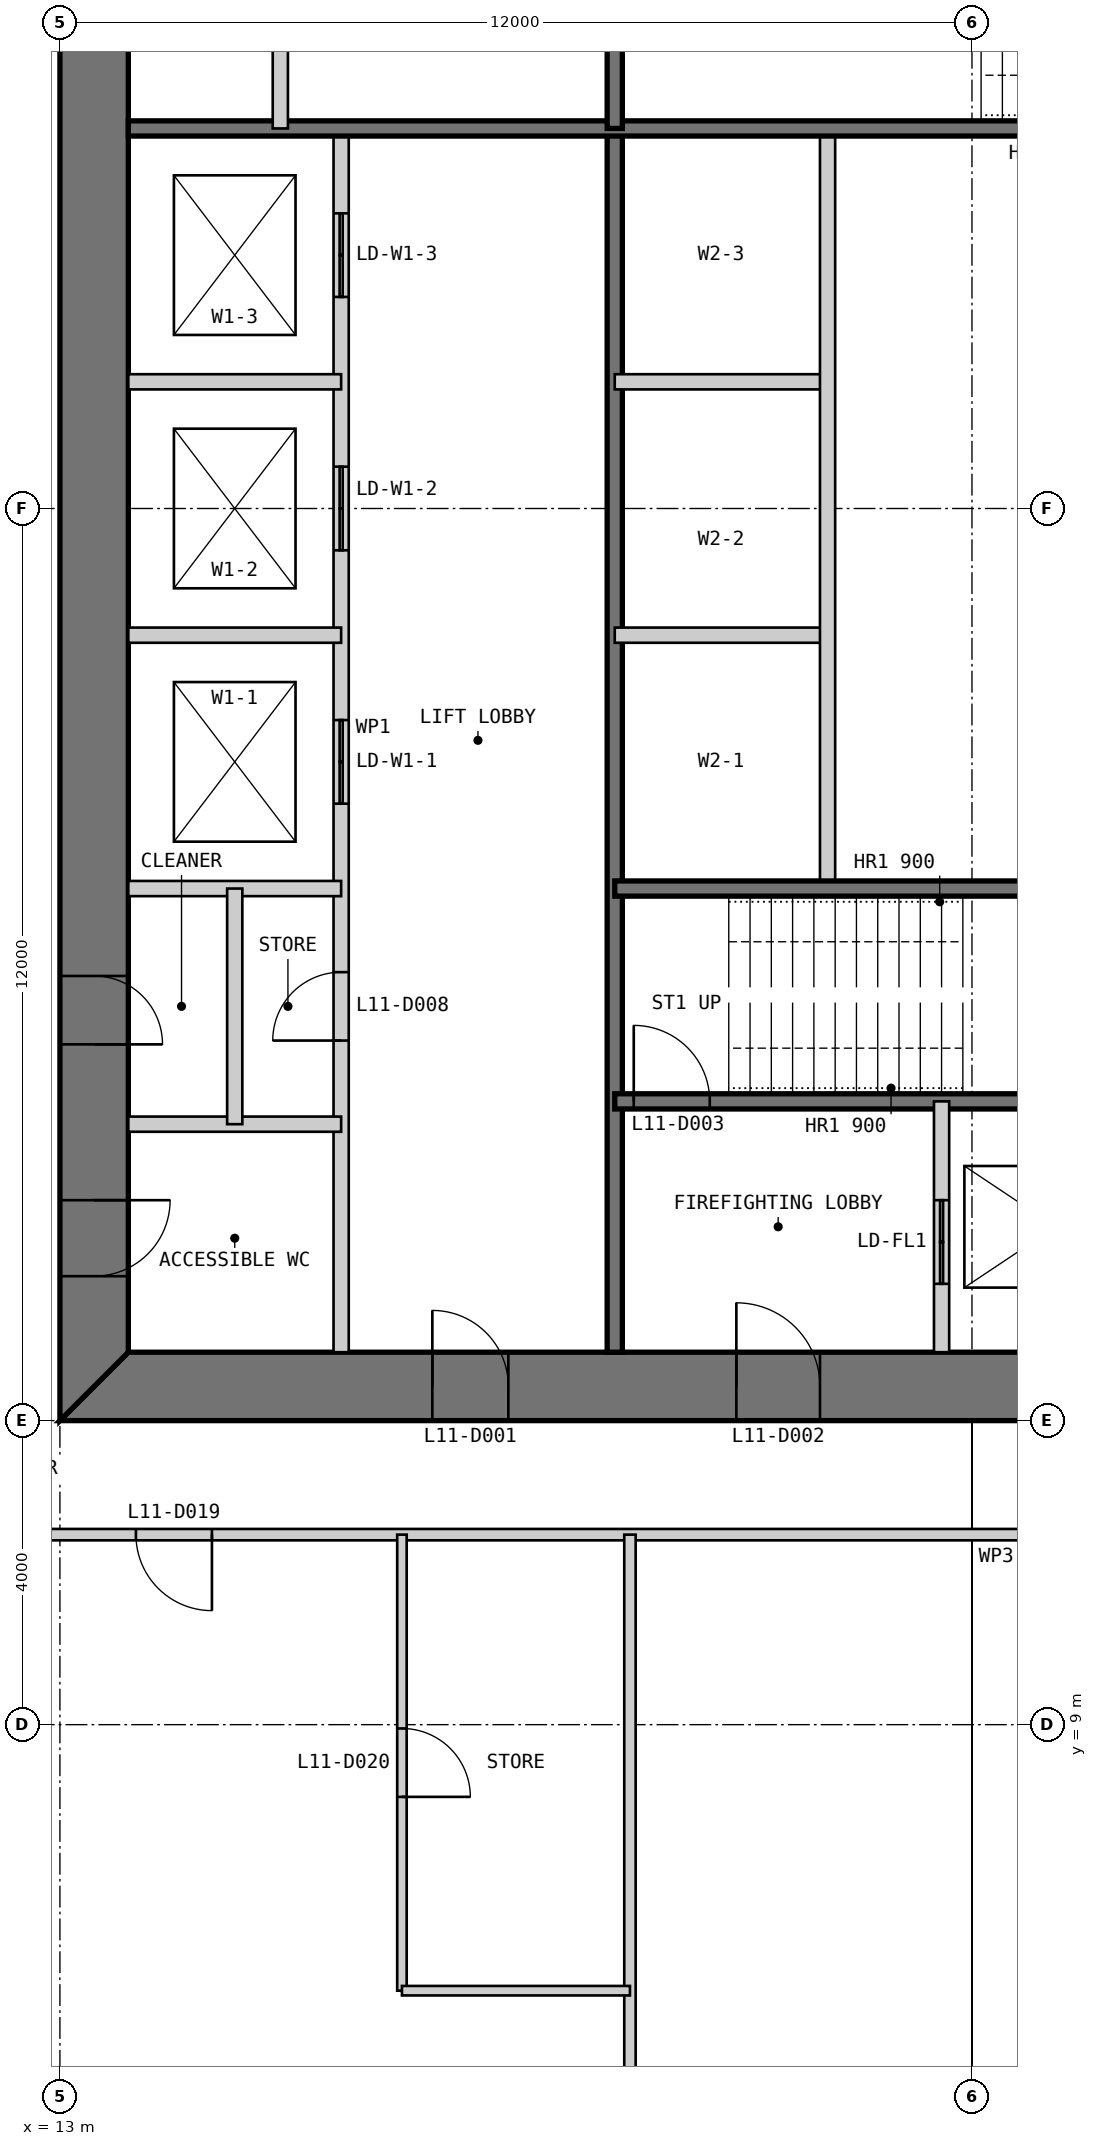
"""IFC4 building model, lengths in metres.
Left out: names, types, materials, properties, quantities, classifications, styles, units other than length and angle.
Written with IfcOpenShell. Run it as: python <this file> out.ifc"""

import sys

from ifc_helpers import new_model, si_unit, direction, frame, frame_2d, origin, place, context, subcontext, project, spatial, polyline, rectangle, outline, extrude, element, fill, save


model = new_model("IFC4")
c1 = context("Model", 3, precision=1e-05, world=origin(), true_north=direction((0.0, 1.0)))
c2 = subcontext(c1, "Body", "Model", "MODEL_VIEW")
j1 = project(units=[si_unit("LENGTHUNIT", "METRE"), si_unit("PLANEANGLEUNIT", "RADIAN")], contexts=[c1])
p1 = place(None, origin())
s1 = spatial("IfcSite", under=j1, at=p1, CompositionType="ELEMENT")
p2 = place(p1, origin())
s2 = spatial("IfcBuilding", under=s1, at=p2, CompositionType="ELEMENT")
p3 = place(p2, frame((0.0, 0.0, 51.0)))
s3 = spatial("IfcBuildingStorey", under=s2, at=p3, CompositionType="ELEMENT", Elevation=51.0)
p4 = place(p3, frame((13.0, 13.45, 0.0), z_axis=(0.0, 0.0, 1.0), x_axis=(1.0, 0.0, 0.0)))
e1 = element("IfcWall", 1, at=p4, inside=s3, PredefinedType="SHEAR", context=c2, shape_type="SweptSolid", body=[
    extrude(outline(polyline([(0.0, -0.45), (24.0, -0.45), (23.1, 0.45), (0.9, 0.45), (0.0, -0.45)])), origin(), (0.0, 0.0, 1.0), 4.0),
])
p5 = place(p4, frame((4.9, 0.0, 0.0)))
e2 = element("IfcOpeningElement", 2, at=p5, cuts=e1, PredefinedType="OPENING", context=c2, shape_type="SweptSolid", body=[
    extrude(rectangle(XDim=1.0, YDim=2.2, at=frame_2d((0.5, 1.1))), frame((0.0, 0.46, 0.0), z_axis=(0.0, -1.0, 0.0), x_axis=(1.0, 0.0, 0.0)), (0.0, 0.0, 1.0), 0.92),
])
p6 = place(p4, frame((8.9, 0.0, 0.0)))
e3 = element("IfcOpeningElement", 3, at=p6, cuts=e1, PredefinedType="OPENING", context=c2, shape_type="SweptSolid", body=[
    extrude(rectangle(XDim=1.1, YDim=2.2, at=frame_2d((0.55, 1.1))), frame((0.0, 0.46, 0.0), z_axis=(0.0, -1.0, 0.0), x_axis=(1.0, 0.0, 0.0)), (0.0, 0.0, 1.0), 0.92),
])
p7 = place(p4, frame((15.05, 0.0, 0.0)))
e4 = element("IfcOpeningElement", 4, at=p7, cuts=e1, PredefinedType="OPENING", context=c2, shape_type="SweptSolid", body=[
    extrude(rectangle(XDim=0.9, YDim=2.2, at=frame_2d((0.45, 1.1))), frame((0.0, 0.46, 0.0), z_axis=(0.0, -1.0, 0.0), x_axis=(1.0, 0.0, 0.0)), (0.0, 0.0, 1.0), 0.92),
])
p8 = place(p4, frame((17.9, 0.0, 0.0)))
e5 = element("IfcOpeningElement", 5, at=p8, cuts=e1, PredefinedType="OPENING", context=c2, shape_type="SweptSolid", body=[
    extrude(rectangle(XDim=1.0, YDim=2.2, at=frame_2d((0.5, 1.1))), frame((0.0, 0.46, 0.0), z_axis=(0.0, -1.0, 0.0), x_axis=(1.0, 0.0, 0.0)), (0.0, 0.0, 1.0), 0.92),
])
p9 = place(p4, frame((21.4, 0.0, 0.0)))
e6 = element("IfcOpeningElement", 6, at=p9, cuts=e1, PredefinedType="OPENING", context=c2, shape_type="SweptSolid", body=[
    extrude(rectangle(XDim=1.0, YDim=2.2, at=frame_2d((0.5, 1.1))), frame((0.0, 0.46, 0.0), z_axis=(0.0, -1.0, 0.0), x_axis=(1.0, 0.0, 0.0)), (0.0, 0.0, 1.0), 0.92),
])
p10 = place(p3, frame((13.45, 36.1, 0.0), z_axis=(0.0, 0.0, 1.0), x_axis=(0.0, -1.0, 0.0)))
e7 = element("IfcWall", 7, at=p10, inside=s3, PredefinedType="SHEAR", context=c2, shape_type="SweptSolid", body=[
    extrude(outline(polyline([(-0.9, -0.45), (23.1, -0.45), (22.2, 0.45), (0.0, 0.45), (-0.9, -0.45)])), origin(), (0.0, 0.0, 1.0), 4.0),
])
p11 = place(p10, frame((20.2, 0.0, 0.0)))
e8 = element("IfcOpeningElement", 8, at=p11, cuts=e7, PredefinedType="OPENING", context=c2, shape_type="SweptSolid", body=[
    extrude(rectangle(XDim=1.0, YDim=2.2, at=frame_2d((0.5, 1.1))), frame((0.0, 0.46, 0.0), z_axis=(0.0, -1.0, 0.0), x_axis=(1.0, 0.0, 0.0)), (0.0, 0.0, 1.0), 0.92),
])
p12 = place(p10, frame((17.25, 0.0, 0.0)))
e9 = element("IfcOpeningElement", 9, at=p12, cuts=e7, PredefinedType="OPENING", context=c2, shape_type="SweptSolid", body=[
    extrude(rectangle(XDim=0.9, YDim=2.2, at=frame_2d((0.45, 1.1))), frame((0.0, 0.46, 0.0), z_axis=(0.0, -1.0, 0.0), x_axis=(1.0, 0.0, 0.0)), (0.0, 0.0, 1.0), 0.92),
])
p13 = place(p3, frame((16.7, 13.9, 0.0), z_axis=(0.0, 0.0, 1.0), x_axis=(0.0, 1.0, 0.0)))
e10 = element("IfcWall", 10, at=p13, inside=s3, PredefinedType="PARTITIONING", context=c2, shape_type="SweptSolid", body=[
    extrude(rectangle(XDim=16.1, YDim=0.2, at=frame_2d((8.05, 0.0))), origin(), (0.0, 0.0, 1.0), 3.8),
])
p14 = place(p13, frame((4.1, 0.0, 0.0)))
e11 = element("IfcOpeningElement", 11, at=p14, cuts=e10, PredefinedType="OPENING", context=c2, shape_type="SweptSolid", body=[
    extrude(rectangle(XDim=0.9, YDim=2.2, at=frame_2d((0.45, 1.1))), frame((0.0, 0.11, 0.0), z_axis=(0.0, -1.0, 0.0), x_axis=(1.0, 0.0, 0.0)), (0.0, 0.0, 1.0), 0.22),
])
p15 = place(p13, frame((7.217, 0.0, 0.0)))
e12 = element("IfcOpeningElement", 12, at=p15, cuts=e10, PredefinedType="OPENING", context=c2, shape_type="SweptSolid", body=[
    extrude(rectangle(XDim=1.1, YDim=2.2, at=frame_2d((0.55, 1.1))), frame((0.0, 0.11, 0.0), z_axis=(0.0, -1.0, 0.0), x_axis=(1.0, 0.0, 0.0)), (0.0, 0.0, 1.0), 0.22),
])
p16 = place(p13, frame((10.55, 0.0, 0.0)))
e13 = element("IfcOpeningElement", 13, at=p16, cuts=e10, PredefinedType="OPENING", context=c2, shape_type="SweptSolid", body=[
    extrude(rectangle(XDim=1.1, YDim=2.2, at=frame_2d((0.55, 1.1))), frame((0.0, 0.11, 0.0), z_axis=(0.0, -1.0, 0.0), x_axis=(1.0, 0.0, 0.0)), (0.0, 0.0, 1.0), 0.22),
])
p17 = place(p13, frame((13.883, 0.0, 0.0)))
e14 = element("IfcOpeningElement", 14, at=p17, cuts=e10, PredefinedType="OPENING", context=c2, shape_type="SweptSolid", body=[
    extrude(rectangle(XDim=1.1, YDim=2.2, at=frame_2d((0.55, 1.1))), frame((0.0, 0.11, 0.0), z_axis=(0.0, -1.0, 0.0), x_axis=(1.0, 0.0, 0.0)), (0.0, 0.0, 1.0), 0.22),
])
p18 = place(p3, frame((20.3, 13.9, 0.0), z_axis=(0.0, 0.0, 1.0), x_axis=(0.0, 1.0, 0.0)))
e15 = element("IfcWall", 15, at=p18, inside=s3, PredefinedType="SOLIDWALL", context=c2, shape_type="SweptSolid", body=[
    extrude(rectangle(XDim=16.1, YDim=0.2, at=frame_2d((8.05, 0.0))), origin(), (0.0, 0.0, 1.0), 3.8),
])
for number, where, z_axis, x_axis in (
    (16, (13.9, 20.0, 0.0), (0.0, 0.0, 1.0), (1.0, 0.0, 0.0)),
    (17, (13.9, 23.333, 0.0), (0.0, 0.0, 1.0), (1.0, 0.0, 0.0)),
    (18, (13.9, 26.667, 0.0), (0.0, 0.0, 1.0), (1.0, 0.0, 0.0)),
    (19, (20.3, 23.333, 0.0), (0.0, 0.0, 1.0), (1.0, 0.0, 0.0)),
    (20, (20.3, 26.667, 0.0), (0.0, 0.0, 1.0), (1.0, 0.0, 0.0)),
):
    element("IfcWall", number, at=place(p3, frame(where, z_axis=z_axis, x_axis=x_axis)), inside=s3, PredefinedType="PARTITIONING", context=c2, shape_type="SweptSolid", body=[
        extrude(rectangle(XDim=2.8, YDim=0.2, at=frame_2d((1.4, 0.0))), origin(), (0.0, 0.0, 1.0), 3.8),
    ])
p19 = place(p3, frame((23.1, 20.0, 0.0), z_axis=(0.0, 0.0, 1.0), x_axis=(0.0, 1.0, 0.0)))
e21 = element("IfcWall", 21, at=p19, inside=s3, PredefinedType="PARTITIONING", context=c2, shape_type="SweptSolid", body=[
    extrude(rectangle(XDim=10.0, YDim=0.2, at=frame_2d((5.0, 0.0))), origin(), (0.0, 0.0, 1.0), 3.8),
])
p20 = place(p3, frame((20.3, 17.2, 0.0), z_axis=(0.0, 0.0, 1.0), x_axis=(1.0, 0.0, 0.0)))
e22 = element("IfcWall", 22, at=p20, inside=s3, PredefinedType="SOLIDWALL", context=c2, shape_type="SweptSolid", body=[
    extrude(rectangle(XDim=9.4, YDim=0.2, at=frame_2d((4.7, 0.0))), origin(), (0.0, 0.0, 1.0), 3.8),
])
p21 = place(p20, frame((0.25, 0.0, 0.0)))
e23 = element("IfcOpeningElement", 23, at=p21, cuts=e22, PredefinedType="OPENING", context=c2, shape_type="SweptSolid", body=[
    extrude(rectangle(XDim=1.0, YDim=2.2, at=frame_2d((0.5, 1.1))), frame((0.0, 0.11, 0.0), z_axis=(0.0, -1.0, 0.0), x_axis=(1.0, 0.0, 0.0)), (0.0, 0.0, 1.0), 0.22),
])
p22 = place(p3, frame((20.3, 20.0, 0.0), z_axis=(0.0, 0.0, 1.0), x_axis=(1.0, 0.0, 0.0)))
e24 = element("IfcWall", 24, at=p22, inside=s3, PredefinedType="SOLIDWALL", context=c2, shape_type="SweptSolid", body=[
    extrude(rectangle(XDim=15.8, YDim=0.2, at=frame_2d((7.9, 0.0))), origin(), (0.0, 0.0, 1.0), 3.8),
])
p23 = place(p3, frame((24.6, 13.9, 0.0), z_axis=(0.0, 0.0, 1.0), x_axis=(0.0, 1.0, 0.0)))
e25 = element("IfcWall", 25, at=p23, inside=s3, PredefinedType="PARTITIONING", context=c2, shape_type="SweptSolid", body=[
    extrude(rectangle(XDim=3.3, YDim=0.2, at=frame_2d((1.65, 0.0))), origin(), (0.0, 0.0, 1.0), 3.8),
])
p24 = place(p23, frame((0.9, 0.0, 0.0)))
e26 = element("IfcOpeningElement", 26, at=p24, cuts=e25, PredefinedType="OPENING", context=c2, shape_type="SweptSolid", body=[
    extrude(rectangle(XDim=1.1, YDim=2.2, at=frame_2d((0.55, 1.1))), frame((0.0, 0.11, 0.0), z_axis=(0.0, -1.0, 0.0), x_axis=(1.0, 0.0, 0.0)), (0.0, 0.0, 1.0), 0.22),
])
p25 = place(p3, frame((13.9, 16.9, 0.0), z_axis=(0.0, 0.0, 1.0), x_axis=(1.0, 0.0, 0.0)))
e27 = element("IfcWall", 27, at=p25, inside=s3, PredefinedType="PARTITIONING", context=c2, shape_type="SweptSolid", body=[
    extrude(rectangle(XDim=2.8, YDim=0.2, at=frame_2d((1.4, 0.0))), origin(), (0.0, 0.0, 1.0), 3.8),
])
p26 = place(p3, frame((15.3, 16.9, 0.0), z_axis=(0.0, 0.0, 1.0), x_axis=(0.0, 1.0, 0.0)))
e28 = element("IfcWall", 28, at=p26, inside=s3, PredefinedType="PARTITIONING", context=c2, shape_type="SweptSolid", body=[
    extrude(rectangle(XDim=3.1, YDim=0.2, at=frame_2d((1.55, 0.0))), origin(), (0.0, 0.0, 1.0), 3.8),
])
p27 = place(p3, frame((29.7, 30.0, 0.0), z_axis=(0.0, 0.0, 1.0), x_axis=(-1.0, 0.0, 0.0)))
e29 = element("IfcWall", 29, at=p27, inside=s3, PredefinedType="SOLIDWALL", context=c2, shape_type="SweptSolid", body=[
    extrude(rectangle(XDim=15.8, YDim=0.2, at=frame_2d((7.9, 0.0))), origin(), (0.0, 0.0, 1.0), 3.8),
])
p28 = place(p3, frame((20.3, 36.1, 0.0), z_axis=(0.0, 0.0, 1.0), x_axis=(0.0, -1.0, 0.0)))
e30 = element("IfcWall", 30, at=p28, inside=s3, PredefinedType="SOLIDWALL", context=c2, shape_type="SweptSolid", body=[
    extrude(rectangle(XDim=6.1, YDim=0.2, at=frame_2d((3.05, 0.0))), origin(), (0.0, 0.0, 1.0), 3.8),
])
p29 = place(p3, frame((15.9, 36.1, 0.0), z_axis=(0.0, 0.0, 1.0), x_axis=(0.0, -1.0, 0.0)))
e31 = element("IfcWall", 31, at=p29, inside=s3, PredefinedType="PARTITIONING", context=c2, shape_type="SweptSolid", body=[
    extrude(rectangle(XDim=6.1, YDim=0.2, at=frame_2d((3.05, 0.0))), origin(), (0.0, 0.0, 1.0), 3.8),
])
p30 = place(p3, frame((11.5, 11.5, 0.0), z_axis=(0.0, 0.0, 1.0), x_axis=(1.0, 0.0, 0.0)))
e32 = element("IfcWall", 32, at=p30, inside=s3, PredefinedType="PARTITIONING", context=c2, shape_type="SweptSolid", body=[
    extrude(rectangle(XDim=27.0, YDim=0.15, at=frame_2d((13.5, 0.0))), origin(), (0.0, 0.0, 1.0), 3.85),
])
p31 = place(p30, frame((2.5, 0.0, 0.0)))
e33 = element("IfcOpeningElement", 33, at=p31, cuts=e32, PredefinedType="OPENING", context=c2, shape_type="SweptSolid", body=[
    extrude(rectangle(XDim=1.0, YDim=2.2, at=frame_2d((0.5, 1.1))), frame((0.0, 0.085, 0.0), z_axis=(0.0, -1.0, 0.0), x_axis=(1.0, 0.0, 0.0)), (0.0, 0.0, 1.0), 0.17),
])
p32 = place(p30, frame((16.0, 0.0, 0.0)))
e34 = element("IfcOpeningElement", 34, at=p32, cuts=e32, PredefinedType="OPENING", context=c2, shape_type="SweptSolid", body=[
    extrude(rectangle(XDim=1.0, YDim=2.2, at=frame_2d((0.5, 1.1))), frame((0.0, 0.085, 0.0), z_axis=(0.0, -1.0, 0.0), x_axis=(1.0, 0.0, 0.0)), (0.0, 0.0, 1.0), 0.17),
])
p33 = place(p3, frame((17.5, 5.5, 0.0), z_axis=(0.0, 0.0, 1.0), x_axis=(0.0, 1.0, 0.0)))
e35 = element("IfcWall", 35, at=p33, inside=s3, PredefinedType="PARTITIONING", context=c2, shape_type="SweptSolid", body=[
    extrude(rectangle(XDim=6.0, YDim=0.125, at=frame_2d((3.0, 0.0))), origin(), (0.0, 0.0, 1.0), 3.85),
])
p34 = place(p33, frame((2.55, 0.0, 0.0)))
e36 = element("IfcOpeningElement", 36, at=p34, cuts=e35, PredefinedType="OPENING", context=c2, shape_type="SweptSolid", body=[
    extrude(rectangle(XDim=0.9, YDim=2.2, at=frame_2d((0.45, 1.1))), frame((0.0, 0.073, 0.0), z_axis=(0.0, -1.0, 0.0), x_axis=(1.0, 0.0, 0.0)), (0.0, 0.0, 1.0), 0.145),
])
p35 = place(p3, frame((20.5, 0.15, 0.0), z_axis=(0.0, 0.0, 1.0), x_axis=(0.0, 1.0, 0.0)))
e37 = element("IfcWall", 37, at=p35, inside=s3, PredefinedType="PARTITIONING", context=c2, shape_type="SweptSolid", body=[
    extrude(rectangle(XDim=11.35, YDim=0.15, at=frame_2d((5.675, 0.0))), origin(), (0.0, 0.0, 1.0), 3.85),
])
p36 = place(p3, frame((17.5, 5.5, 0.0), z_axis=(0.0, 0.0, 1.0), x_axis=(1.0, 0.0, 0.0)))
e38 = element("IfcWall", 38, at=p36, inside=s3, PredefinedType="PARTITIONING", context=c2, shape_type="SweptSolid", body=[
    extrude(rectangle(XDim=3.0, YDim=0.125, at=frame_2d((1.5, 0.0))), origin(), (0.0, 0.0, 1.0), 3.85),
])
p37 = place(p5, origin())
e39 = element("IfcDoor", 39, at=p37, inside=s3, OperationType="SINGLE_SWING_LEFT", PredefinedType="DOOR", context=c2, shape_type="SweptSolid", body=[
    extrude(rectangle(XDim=1.0, YDim=2.2, at=frame_2d((0.5, 1.1))), frame((0.0, 0.025, 0.0), z_axis=(0.0, -1.0, 0.0), x_axis=(1.0, 0.0, 0.0)), (0.0, 0.0, 1.0), 0.05),
    extrude(outline(polyline([(0.0, 0.0), (0.04, 0.0), (0.04, 2.16), (0.96, 2.16), (0.96, 0.0), (1.0, 0.0), (1.0, 2.2), (0.0, 2.2), (0.0, 0.0)])), frame((0.0, 0.3, 0.0), z_axis=(0.0, -1.0, 0.0), x_axis=(1.0, 0.0, 0.0)), (0.0, 0.0, 1.0), 0.6),
])
fill(e2, e39)
p38 = place(p6, origin())
e40 = element("IfcDoor", 40, at=p38, inside=s3, OperationType="SINGLE_SWING_LEFT", PredefinedType="DOOR", context=c2, shape_type="SweptSolid", body=[
    extrude(rectangle(XDim=1.1, YDim=2.2, at=frame_2d((0.55, 1.1))), frame((0.0, 0.025, 0.0), z_axis=(0.0, -1.0, 0.0), x_axis=(1.0, 0.0, 0.0)), (0.0, 0.0, 1.0), 0.05),
    extrude(outline(polyline([(0.0, 0.0), (0.04, 0.0), (0.04, 2.16), (1.06, 2.16), (1.06, 0.0), (1.1, 0.0), (1.1, 2.2), (0.0, 2.2), (0.0, 0.0)])), frame((0.0, 0.3, 0.0), z_axis=(0.0, -1.0, 0.0), x_axis=(1.0, 0.0, 0.0)), (0.0, 0.0, 1.0), 0.6),
])
fill(e3, e40)
p39 = place(p21, origin())
e41 = element("IfcDoor", 41, at=p39, inside=s3, OperationType="SINGLE_SWING_LEFT", PredefinedType="DOOR", context=c2, shape_type="SweptSolid", body=[
    extrude(rectangle(XDim=1.0, YDim=2.2, at=frame_2d((0.5, 1.1))), frame((0.0, 0.025, 0.0), z_axis=(0.0, -1.0, 0.0), x_axis=(1.0, 0.0, 0.0)), (0.0, 0.0, 1.0), 0.05),
])
fill(e23, e41)
p40 = place(p11, origin())
e42 = element("IfcDoor", 42, at=p40, inside=s3, OperationType="SINGLE_SWING_LEFT", PredefinedType="DOOR", context=c2, shape_type="SweptSolid", body=[
    extrude(rectangle(XDim=1.0, YDim=2.2, at=frame_2d((0.5, 1.1))), frame((0.0, 0.025, 0.0), z_axis=(0.0, -1.0, 0.0), x_axis=(1.0, 0.0, 0.0)), (0.0, 0.0, 1.0), 0.05),
    extrude(outline(polyline([(0.0, 0.0), (0.04, 0.0), (0.04, 2.16), (0.96, 2.16), (0.96, 0.0), (1.0, 0.0), (1.0, 2.2), (0.0, 2.2), (0.0, 0.0)])), frame((0.0, 0.3, 0.0), z_axis=(0.0, -1.0, 0.0), x_axis=(1.0, 0.0, 0.0)), (0.0, 0.0, 1.0), 0.6),
])
fill(e8, e42)
p41 = place(p14, origin())
e43 = element("IfcDoor", 43, at=p41, inside=s3, OperationType="SINGLE_SWING_LEFT", PredefinedType="DOOR", context=c2, shape_type="SweptSolid", body=[
    extrude(rectangle(XDim=0.9, YDim=2.2, at=frame_2d((0.45, 1.1))), frame((0.0, 0.025, 0.0), z_axis=(0.0, -1.0, 0.0), x_axis=(1.0, 0.0, 0.0)), (0.0, 0.0, 1.0), 0.05),
])
fill(e11, e43)
p42 = place(p12, origin())
e44 = element("IfcDoor", 44, at=p42, inside=s3, OperationType="SINGLE_SWING_RIGHT", PredefinedType="DOOR", context=c2, shape_type="SweptSolid", body=[
    extrude(rectangle(XDim=0.9, YDim=2.2, at=frame_2d((0.45, 1.1))), frame((0.0, 0.025, 0.0), z_axis=(0.0, -1.0, 0.0), x_axis=(1.0, 0.0, 0.0)), (0.0, 0.0, 1.0), 0.05),
    extrude(outline(polyline([(0.0, 0.0), (0.04, 0.0), (0.04, 2.16), (0.86, 2.16), (0.86, 0.0), (0.9, 0.0), (0.9, 2.2), (0.0, 2.2), (0.0, 0.0)])), frame((0.0, 0.3, 0.0), z_axis=(0.0, -1.0, 0.0), x_axis=(1.0, 0.0, 0.0)), (0.0, 0.0, 1.0), 0.6),
])
fill(e9, e44)
p43 = place(p31, frame((1.0, 0.0, 0.0), z_axis=(0.0, 0.0, 1.0), x_axis=(-1.0, 0.0, 0.0)))
e45 = element("IfcDoor", 45, at=p43, inside=s3, OperationType="SINGLE_SWING_LEFT", PredefinedType="DOOR", context=c2, shape_type="SweptSolid", body=[
    extrude(rectangle(XDim=1.0, YDim=2.2, at=frame_2d((0.5, 1.1))), frame((0.0, 0.025, 0.0), z_axis=(0.0, -1.0, 0.0), x_axis=(1.0, 0.0, 0.0)), (0.0, 0.0, 1.0), 0.05),
])
fill(e33, e45)
p44 = place(p34, frame((0.9, 0.0, 0.0), z_axis=(0.0, 0.0, 1.0), x_axis=(-1.0, 0.0, 0.0)))
e46 = element("IfcDoor", 46, at=p44, inside=s3, OperationType="SINGLE_SWING_RIGHT", PredefinedType="DOOR", context=c2, shape_type="SweptSolid", body=[
    extrude(rectangle(XDim=0.9, YDim=2.2, at=frame_2d((0.45, 1.1))), frame((0.0, 0.025, 0.0), z_axis=(0.0, -1.0, 0.0), x_axis=(1.0, 0.0, 0.0)), (0.0, 0.0, 1.0), 0.05),
])
fill(e36, e46)
p45 = place(p24, origin())
e47 = element("IfcDoor", 47, at=p45, inside=s3, OperationType="DOUBLE_DOOR_SLIDING", PredefinedType="DOOR", context=c2, shape_type="SweptSolid", body=[
    extrude(rectangle(XDim=1.1, YDim=2.2, at=frame_2d((0.55, 1.1))), frame((0.0, 0.025, 0.0), z_axis=(0.0, -1.0, 0.0), x_axis=(1.0, 0.0, 0.0)), (0.0, 0.0, 1.0), 0.05),
])
fill(e26, e47)
p46 = place(p15, origin())
e48 = element("IfcDoor", 48, at=p46, inside=s3, OperationType="DOUBLE_DOOR_SLIDING", PredefinedType="DOOR", context=c2, shape_type="SweptSolid", body=[
    extrude(rectangle(XDim=1.1, YDim=2.2, at=frame_2d((0.55, 1.1))), frame((0.0, 0.025, 0.0), z_axis=(0.0, -1.0, 0.0), x_axis=(1.0, 0.0, 0.0)), (0.0, 0.0, 1.0), 0.05),
])
fill(e12, e48)
p47 = place(p16, origin())
e49 = element("IfcDoor", 49, at=p47, inside=s3, OperationType="DOUBLE_DOOR_SLIDING", PredefinedType="DOOR", context=c2, shape_type="SweptSolid", body=[
    extrude(rectangle(XDim=1.1, YDim=2.2, at=frame_2d((0.55, 1.1))), frame((0.0, 0.025, 0.0), z_axis=(0.0, -1.0, 0.0), x_axis=(1.0, 0.0, 0.0)), (0.0, 0.0, 1.0), 0.05),
])
fill(e13, e49)
p48 = place(p17, origin())
e50 = element("IfcDoor", 50, at=p48, inside=s3, OperationType="DOUBLE_DOOR_SLIDING", PredefinedType="DOOR", context=c2, shape_type="SweptSolid", body=[
    extrude(rectangle(XDim=1.1, YDim=2.2, at=frame_2d((0.55, 1.1))), frame((0.0, 0.025, 0.0), z_axis=(0.0, -1.0, 0.0), x_axis=(1.0, 0.0, 0.0)), (0.0, 0.0, 1.0), 0.05),
])
fill(e14, e50)
save(model, sys.argv[1])
